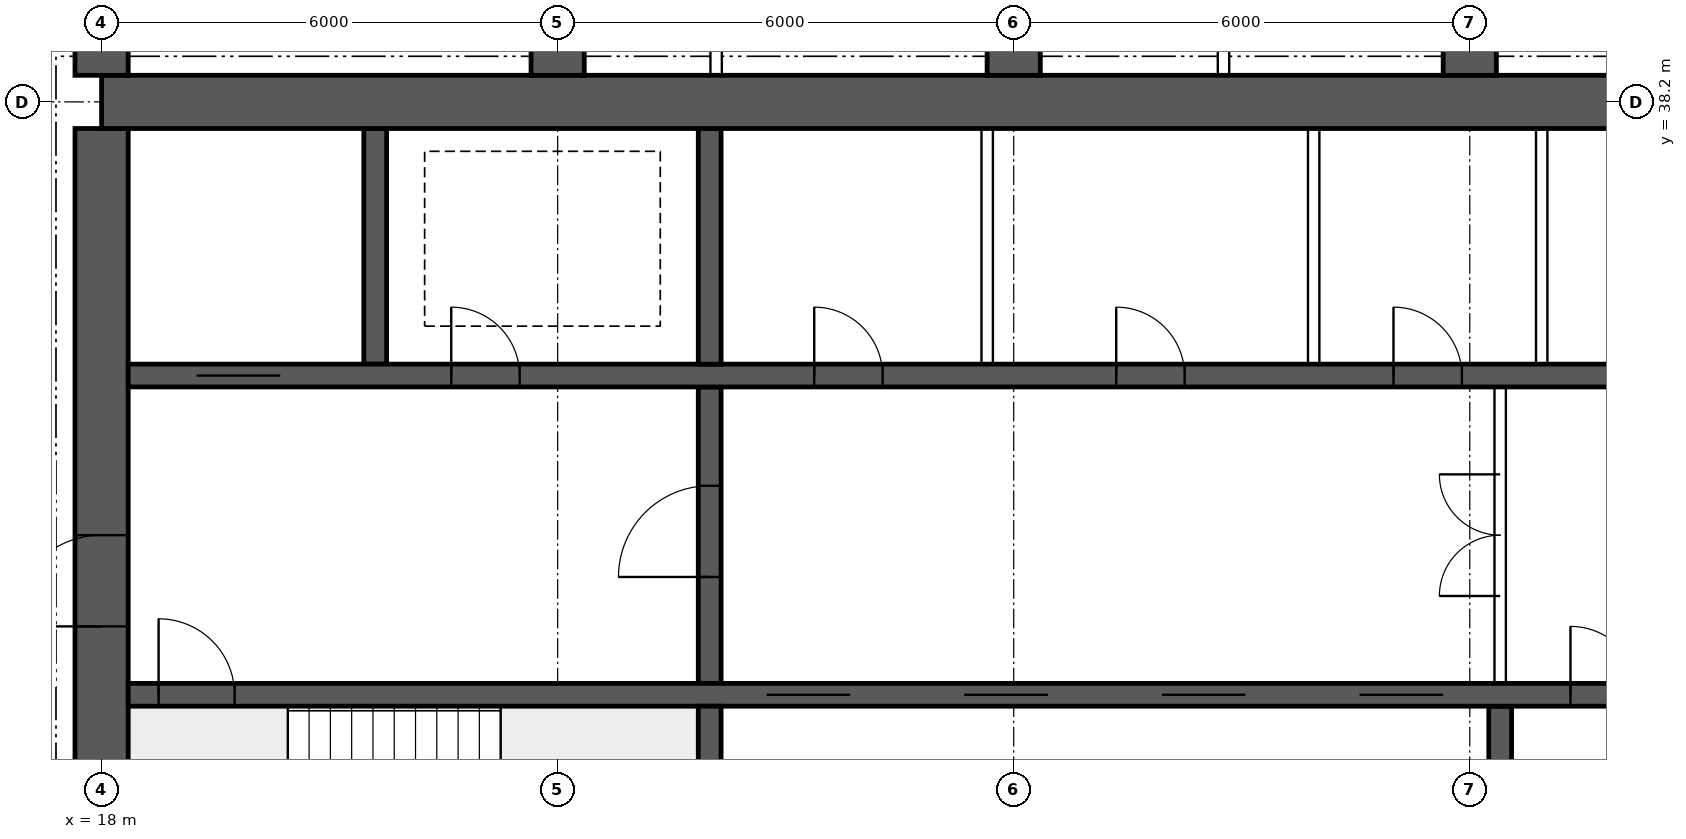
"""IFC4 building model, lengths in metres.
Left out: names, types, materials, properties, quantities, classifications, styles, units other than length and angle.
Written with IfcOpenShell. Run it as: python <this file> out.ifc"""

import sys

from ifc_helpers import new_model, si_unit, direction, frame, frame_2d, origin, place, context, subcontext, project, spatial, rectangle, extrude, element, fill, save


model = new_model("IFC4")
c1 = context("Model", 3, precision=1e-05, world=origin(), true_north=direction((0.0, 1.0)))
c2 = subcontext(c1, "Body", "Model", "MODEL_VIEW")
j1 = project(units=[si_unit("LENGTHUNIT", "METRE"), si_unit("PLANEANGLEUNIT", "RADIAN")], contexts=[c1])
p1 = place(None, origin())
s1 = spatial("IfcSite", under=j1, at=p1, CompositionType="ELEMENT")
p2 = place(p1, origin())
s2 = spatial("IfcBuilding", under=s1, at=p2, CompositionType="ELEMENT")
p3 = place(p2, frame((0.0, 0.0, 216.55)))
s3 = spatial("IfcBuildingStorey", under=s2, at=p3, CompositionType="ELEMENT", Elevation=216.55)
p4 = place(p3, frame((18.0, 38.2, 0.0), z_axis=(0.0, 0.0, 1.0), x_axis=(1.0, 0.0, 0.0)))
e1 = element("IfcWall", 1, at=p4, inside=s3, PredefinedType="SHEAR", context=c2, shape_type="SweptSolid", body=[
    extrude(rectangle(XDim=48.0, YDim=0.7, at=frame_2d((24.0, 0.0))), origin(), (0.0, 0.0, 1.0), 3.75),
])
p5 = place(p3, frame((18.0, 26.15, 0.0), z_axis=(0.0, 0.0, 1.0), x_axis=(0.0, 1.0, 0.0)))
e2 = element("IfcWall", 2, at=p5, inside=s3, PredefinedType="SHEAR", context=c2, shape_type="SweptSolid", body=[
    extrude(rectangle(XDim=11.7, YDim=0.7, at=frame_2d((5.85, 0.0))), origin(), (0.0, 0.0, 1.0), 3.75),
])
p6 = place(p5, frame((5.15, 0.0, 0.0)))
e3 = element("IfcOpeningElement", 3, at=p6, cuts=e2, PredefinedType="OPENING", context=c2, shape_type="SweptSolid", body=[
    extrude(rectangle(XDim=1.2, YDim=2.1, at=frame_2d((0.6, 1.05))), frame((0.0, 0.36, 0.0), z_axis=(0.0, -1.0, 0.0), x_axis=(1.0, 0.0, 0.0)), (0.0, 0.0, 1.0), 0.72),
])
p7 = place(p3, frame((18.35, 30.4, 0.0), z_axis=(0.0, 0.0, 1.0), x_axis=(1.0, 0.0, 0.0)))
e4 = element("IfcWall", 4, at=p7, inside=s3, PredefinedType="SHEAR", context=c2, shape_type="SweptSolid", body=[
    extrude(rectangle(XDim=47.3, YDim=0.3, at=frame_2d((23.65, 0.0))), origin(), (0.0, 0.0, 1.0), 3.75),
])
p8 = place(p7, frame((0.4, 0.0, 0.0)))
e5 = element("IfcOpeningElement", 5, at=p8, cuts=e4, PredefinedType="OPENING", context=c2, shape_type="SweptSolid", body=[
    extrude(rectangle(XDim=1.0, YDim=2.1, at=frame_2d((0.5, 1.05))), frame((0.0, 0.16, 0.0), z_axis=(0.0, -1.0, 0.0), x_axis=(1.0, 0.0, 0.0)), (0.0, 0.0, 1.0), 0.32),
])
p9 = place(p7, frame((45.9, 0.0, 0.0)))
e6 = element("IfcOpeningElement", 6, at=p9, cuts=e4, PredefinedType="OPENING", context=c2, shape_type="SweptSolid", body=[
    extrude(rectangle(XDim=1.0, YDim=2.1, at=frame_2d((0.5, 1.05))), frame((0.0, 0.16, 0.0), z_axis=(0.0, -1.0, 0.0), x_axis=(1.0, 0.0, 0.0)), (0.0, 0.0, 1.0), 0.32),
])
p10 = place(p7, frame((8.4, 0.0, 0.0)))
e7 = element("IfcOpeningElement", 7, at=p10, cuts=e4, PredefinedType="OPENING", context=c2, shape_type="SweptSolid", body=[
    extrude(rectangle(XDim=1.1, YDim=2.1, at=frame_2d((0.55, 1.05))), frame((0.0, 0.16, 0.0), z_axis=(0.0, -1.0, 0.0), x_axis=(1.0, 0.0, 0.0)), (0.0, 0.0, 1.0), 0.32),
])
p11 = place(p7, frame((11.0, 0.0, 0.0)))
e8 = element("IfcOpeningElement", 8, at=p11, cuts=e4, PredefinedType="OPENING", context=c2, shape_type="SweptSolid", body=[
    extrude(rectangle(XDim=1.1, YDim=2.1, at=frame_2d((0.55, 1.05))), frame((0.0, 0.16, 0.0), z_axis=(0.0, -1.0, 0.0), x_axis=(1.0, 0.0, 0.0)), (0.0, 0.0, 1.0), 0.32),
])
p12 = place(p7, frame((13.6, 0.0, 0.0)))
e9 = element("IfcOpeningElement", 9, at=p12, cuts=e4, PredefinedType="OPENING", context=c2, shape_type="SweptSolid", body=[
    extrude(rectangle(XDim=1.1, YDim=2.1, at=frame_2d((0.55, 1.05))), frame((0.0, 0.16, 0.0), z_axis=(0.0, -1.0, 0.0), x_axis=(1.0, 0.0, 0.0)), (0.0, 0.0, 1.0), 0.32),
])
p13 = place(p7, frame((16.2, 0.0, 0.0)))
e10 = element("IfcOpeningElement", 10, at=p13, cuts=e4, PredefinedType="OPENING", context=c2, shape_type="SweptSolid", body=[
    extrude(rectangle(XDim=1.1, YDim=2.1, at=frame_2d((0.55, 1.05))), frame((0.0, 0.16, 0.0), z_axis=(0.0, -1.0, 0.0), x_axis=(1.0, 0.0, 0.0)), (0.0, 0.0, 1.0), 0.32),
])
p14 = place(p7, frame((18.975, 0.0, 0.0)))
e11 = element("IfcOpeningElement", 11, at=p14, cuts=e4, PredefinedType="OPENING", context=c2, shape_type="SweptSolid", body=[
    extrude(rectangle(XDim=0.9, YDim=2.1, at=frame_2d((0.45, 1.05))), frame((0.0, 0.16, 0.0), z_axis=(0.0, -1.0, 0.0), x_axis=(1.0, 0.0, 0.0)), (0.0, 0.0, 1.0), 0.32),
])
p15 = place(p7, frame((24.475, 0.0, 0.0)))
e12 = element("IfcOpeningElement", 12, at=p15, cuts=e4, PredefinedType="OPENING", context=c2, shape_type="SweptSolid", body=[
    extrude(rectangle(XDim=0.9, YDim=2.1, at=frame_2d((0.45, 1.05))), frame((0.0, 0.16, 0.0), z_axis=(0.0, -1.0, 0.0), x_axis=(1.0, 0.0, 0.0)), (0.0, 0.0, 1.0), 0.32),
])
p16 = place(p7, frame((30.267, 0.0, 0.0)))
e13 = element("IfcOpeningElement", 13, at=p16, cuts=e4, PredefinedType="OPENING", context=c2, shape_type="SweptSolid", body=[
    extrude(rectangle(XDim=1.1, YDim=2.1, at=frame_2d((0.55, 1.05))), frame((0.0, 0.16, 0.0), z_axis=(0.0, -1.0, 0.0), x_axis=(1.0, 0.0, 0.0)), (0.0, 0.0, 1.0), 0.32),
])
p17 = place(p7, frame((33.8, 0.0, 0.0)))
e14 = element("IfcOpeningElement", 14, at=p17, cuts=e4, PredefinedType="OPENING", context=c2, shape_type="SweptSolid", body=[
    extrude(rectangle(XDim=1.1, YDim=2.1, at=frame_2d((0.55, 1.05))), frame((0.0, 0.16, 0.0), z_axis=(0.0, -1.0, 0.0), x_axis=(1.0, 0.0, 0.0)), (0.0, 0.0, 1.0), 0.32),
])
p18 = place(p7, frame((37.333, 0.0, 0.0)))
e15 = element("IfcOpeningElement", 15, at=p18, cuts=e4, PredefinedType="OPENING", context=c2, shape_type="SweptSolid", body=[
    extrude(rectangle(XDim=1.1, YDim=2.1, at=frame_2d((0.55, 1.05))), frame((0.0, 0.16, 0.0), z_axis=(0.0, -1.0, 0.0), x_axis=(1.0, 0.0, 0.0)), (0.0, 0.0, 1.0), 0.32),
])
p19 = place(p3, frame((18.35, 34.6, 0.0), z_axis=(0.0, 0.0, 1.0), x_axis=(1.0, 0.0, 0.0)))
e16 = element("IfcWall", 16, at=p19, inside=s3, PredefinedType="SHEAR", context=c2, shape_type="SweptSolid", body=[
    extrude(rectangle(XDim=47.3, YDim=0.3, at=frame_2d((23.65, 0.0))), origin(), (0.0, 0.0, 1.0), 3.75),
])
p20 = place(p19, frame((0.9, 0.0, 0.0)))
e17 = element("IfcOpeningElement", 17, at=p20, cuts=e16, PredefinedType="OPENING", context=c2, shape_type="SweptSolid", body=[
    extrude(rectangle(XDim=1.1, YDim=2.1, at=frame_2d((0.55, 1.05))), frame((0.0, 0.16, 0.0), z_axis=(0.0, -1.0, 0.0), x_axis=(1.0, 0.0, 0.0)), (0.0, 0.0, 1.0), 0.32),
])
p21 = place(p19, frame((45.3, 0.0, 0.0)))
e18 = element("IfcOpeningElement", 18, at=p21, cuts=e16, PredefinedType="OPENING", context=c2, shape_type="SweptSolid", body=[
    extrude(rectangle(XDim=1.1, YDim=2.1, at=frame_2d((0.55, 1.05))), frame((0.0, 0.16, 0.0), z_axis=(0.0, -1.0, 0.0), x_axis=(1.0, 0.0, 0.0)), (0.0, 0.0, 1.0), 0.32),
])
p22 = place(p19, frame((4.25, 0.0, 0.0)))
e19 = element("IfcOpeningElement", 19, at=p22, cuts=e16, PredefinedType="OPENING", context=c2, shape_type="SweptSolid", body=[
    extrude(rectangle(XDim=0.9, YDim=2.1, at=frame_2d((0.45, 1.05))), frame((0.0, 0.16, 0.0), z_axis=(0.0, -1.0, 0.0), x_axis=(1.0, 0.0, 0.0)), (0.0, 0.0, 1.0), 0.32),
])
p23 = place(p19, frame((42.15, 0.0, 0.0)))
e20 = element("IfcOpeningElement", 20, at=p23, cuts=e16, PredefinedType="OPENING", context=c2, shape_type="SweptSolid", body=[
    extrude(rectangle(XDim=0.9, YDim=2.1, at=frame_2d((0.45, 1.05))), frame((0.0, 0.16, 0.0), z_axis=(0.0, -1.0, 0.0), x_axis=(1.0, 0.0, 0.0)), (0.0, 0.0, 1.0), 0.32),
])
p24 = place(p19, frame((9.025, 0.0, 0.0)))
e21 = element("IfcOpeningElement", 21, at=p24, cuts=e16, PredefinedType="OPENING", context=c2, shape_type="SweptSolid", body=[
    extrude(rectangle(XDim=0.9, YDim=2.1, at=frame_2d((0.45, 1.05))), frame((0.0, 0.16, 0.0), z_axis=(0.0, -1.0, 0.0), x_axis=(1.0, 0.0, 0.0)), (0.0, 0.0, 1.0), 0.32),
])
p25 = place(p19, frame((12.999, 0.0, 0.0)))
e22 = element("IfcOpeningElement", 22, at=p25, cuts=e16, PredefinedType="OPENING", context=c2, shape_type="SweptSolid", body=[
    extrude(rectangle(XDim=0.9, YDim=2.1, at=frame_2d((0.45, 1.05))), frame((0.0, 0.16, 0.0), z_axis=(0.0, -1.0, 0.0), x_axis=(1.0, 0.0, 0.0)), (0.0, 0.0, 1.0), 0.32),
])
p26 = place(p19, frame((16.646, 0.0, 0.0)))
e23 = element("IfcOpeningElement", 23, at=p26, cuts=e16, PredefinedType="OPENING", context=c2, shape_type="SweptSolid", body=[
    extrude(rectangle(XDim=0.9, YDim=2.1, at=frame_2d((0.45, 1.05))), frame((0.0, 0.16, 0.0), z_axis=(0.0, -1.0, 0.0), x_axis=(1.0, 0.0, 0.0)), (0.0, 0.0, 1.0), 0.32),
])
p27 = place(p19, frame((20.405, 0.0, 0.0)))
e24 = element("IfcOpeningElement", 24, at=p27, cuts=e16, PredefinedType="OPENING", context=c2, shape_type="SweptSolid", body=[
    extrude(rectangle(XDim=0.9, YDim=2.1, at=frame_2d((0.45, 1.05))), frame((0.0, 0.16, 0.0), z_axis=(0.0, -1.0, 0.0), x_axis=(1.0, 0.0, 0.0)), (0.0, 0.0, 1.0), 0.32),
])
p28 = place(p19, frame((24.811, 0.0, 0.0)))
e25 = element("IfcOpeningElement", 25, at=p28, cuts=e16, PredefinedType="OPENING", context=c2, shape_type="SweptSolid", body=[
    extrude(rectangle(XDim=0.9, YDim=2.1, at=frame_2d((0.45, 1.05))), frame((0.0, 0.16, 0.0), z_axis=(0.0, -1.0, 0.0), x_axis=(1.0, 0.0, 0.0)), (0.0, 0.0, 1.0), 0.32),
])
p29 = place(p19, frame((27.608, 0.0, 0.0)))
e26 = element("IfcOpeningElement", 26, at=p29, cuts=e16, PredefinedType="OPENING", context=c2, shape_type="SweptSolid", body=[
    extrude(rectangle(XDim=0.9, YDim=2.1, at=frame_2d((0.45, 1.05))), frame((0.0, 0.16, 0.0), z_axis=(0.0, -1.0, 0.0), x_axis=(1.0, 0.0, 0.0)), (0.0, 0.0, 1.0), 0.32),
])
p30 = place(p19, frame((29.981, 0.0, 0.0)))
e27 = element("IfcOpeningElement", 27, at=p30, cuts=e16, PredefinedType="OPENING", context=c2, shape_type="SweptSolid", body=[
    extrude(rectangle(XDim=0.9, YDim=2.1, at=frame_2d((0.45, 1.05))), frame((0.0, 0.16, 0.0), z_axis=(0.0, -1.0, 0.0), x_axis=(1.0, 0.0, 0.0)), (0.0, 0.0, 1.0), 0.32),
])
p31 = place(p19, frame((33.831, 0.0, 0.0)))
e28 = element("IfcOpeningElement", 28, at=p31, cuts=e16, PredefinedType="OPENING", context=c2, shape_type="SweptSolid", body=[
    extrude(rectangle(XDim=0.9, YDim=2.1, at=frame_2d((0.45, 1.05))), frame((0.0, 0.16, 0.0), z_axis=(0.0, -1.0, 0.0), x_axis=(1.0, 0.0, 0.0)), (0.0, 0.0, 1.0), 0.32),
])
p32 = place(p19, frame((37.579, 0.0, 0.0)))
e29 = element("IfcOpeningElement", 29, at=p32, cuts=e16, PredefinedType="OPENING", context=c2, shape_type="SweptSolid", body=[
    extrude(rectangle(XDim=0.9, YDim=2.1, at=frame_2d((0.45, 1.05))), frame((0.0, 0.16, 0.0), z_axis=(0.0, -1.0, 0.0), x_axis=(1.0, 0.0, 0.0)), (0.0, 0.0, 1.0), 0.32),
])
p33 = place(p3, frame((26.0, 26.15, 0.0), z_axis=(0.0, 0.0, 1.0), x_axis=(0.0, 1.0, 0.0)))
e30 = element("IfcWall", 30, at=p33, inside=s3, PredefinedType="SHEAR", context=c2, shape_type="SweptSolid", body=[
    extrude(rectangle(XDim=4.1, YDim=0.3, at=frame_2d((2.05, 0.0))), origin(), (0.0, 0.0, 1.0), 3.75),
])
p34 = place(p3, frame((26.0, 30.55, 0.0), z_axis=(0.0, 0.0, 1.0), x_axis=(0.0, 1.0, 0.0)))
e31 = element("IfcWall", 31, at=p34, inside=s3, PredefinedType="SHEAR", context=c2, shape_type="SweptSolid", body=[
    extrude(rectangle(XDim=3.9, YDim=0.3, at=frame_2d((1.95, 0.0))), origin(), (0.0, 0.0, 1.0), 3.75),
])
p35 = place(p34, frame((1.4, 0.0, 0.0)))
e32 = element("IfcOpeningElement", 32, at=p35, cuts=e31, PredefinedType="OPENING", context=c2, shape_type="SweptSolid", body=[
    extrude(rectangle(XDim=1.2, YDim=2.1, at=frame_2d((0.6, 1.05))), frame((0.0, 0.16, 0.0), z_axis=(0.0, -1.0, 0.0), x_axis=(1.0, 0.0, 0.0)), (0.0, 0.0, 1.0), 0.32),
])
for number, where, z_axis, x_axis in (
    (33, (21.6, 34.75, 0.0), (0.0, 0.0, 1.0), (0.0, 1.0, 0.0)),
    (34, (26.0, 34.75, 0.0), (0.0, 0.0, 1.0), (0.0, 1.0, 0.0)),
):
    element("IfcWall", number, at=place(p3, frame(where, z_axis=z_axis, x_axis=x_axis)), inside=s3, PredefinedType="SHEAR", context=c2, shape_type="SweptSolid", body=[
        extrude(rectangle(XDim=3.1, YDim=0.3, at=frame_2d((1.55, 0.0))), origin(), (0.0, 0.0, 1.0), 3.75),
    ])
p36 = place(p3, frame((36.4, 26.15, 0.0), z_axis=(0.0, 0.0, 1.0), x_axis=(0.0, 1.0, 0.0)))
e35 = element("IfcWall", 35, at=p36, inside=s3, PredefinedType="SHEAR", context=c2, shape_type="SweptSolid", body=[
    extrude(rectangle(XDim=4.1, YDim=0.3, at=frame_2d((2.05, 0.0))), origin(), (0.0, 0.0, 1.0), 3.75),
])
for number, where, z_axis, x_axis in (
    (36, (18.0, 38.55, 0.0), (0.0, 0.0, 1.0), (0.0, 1.0, 0.0)),
    (37, (24.0, 38.55, 0.0), (0.0, 0.0, 1.0), (0.0, 1.0, 0.0)),
    (38, (30.0, 38.55, 0.0), (0.0, 0.0, 1.0), (0.0, 1.0, 0.0)),
    (39, (36.0, 38.55, 0.0), (0.0, 0.0, 1.0), (0.0, 1.0, 0.0)),
):
    element("IfcWall", number, at=place(p3, frame(where, z_axis=z_axis, x_axis=x_axis)), inside=s3, PredefinedType="SHEAR", context=c2, shape_type="SweptSolid", body=[
        extrude(rectangle(XDim=7.05, YDim=0.7, at=frame_2d((3.525, 0.0))), origin(), (0.0, 0.0, 1.0), 3.75),
    ])
p37 = place(p3, frame((36.4, 30.55, 0.0), z_axis=(0.0, 0.0, 1.0), x_axis=(0.0, 1.0, 0.0)))
e40 = element("IfcWall", 40, at=p37, inside=s3, PredefinedType="SOLIDWALL", context=c2, shape_type="SweptSolid", body=[
    extrude(rectangle(XDim=3.9, YDim=0.15, at=frame_2d((1.95, 0.0))), origin(), (0.0, 0.0, 1.0), 3.5),
])
p38 = place(p37, frame((1.15, 0.0, 0.0)))
e41 = element("IfcOpeningElement", 41, at=p38, cuts=e40, PredefinedType="OPENING", context=c2, shape_type="SweptSolid", body=[
    extrude(rectangle(XDim=1.6, YDim=2.1, at=frame_2d((0.8, 1.05))), frame((0.0, 0.085, 0.0), z_axis=(0.0, -1.0, 0.0), x_axis=(1.0, 0.0, 0.0)), (0.0, 0.0, 1.0), 0.17),
])
for number, where, z_axis, x_axis in (
    (42, (29.651, 34.75, 0.0), (0.0, 0.0, 1.0), (0.0, 1.0, 0.0)),
    (43, (33.946, 34.75, 0.0), (0.0, 0.0, 1.0), (0.0, 1.0, 0.0)),
    (44, (36.946, 34.75, 0.0), (0.0, 0.0, 1.0), (0.0, 1.0, 0.0)),
):
    element("IfcWall", number, at=place(p3, frame(where, z_axis=z_axis, x_axis=x_axis)), inside=s3, PredefinedType="SOLIDWALL", context=c2, shape_type="SweptSolid", body=[
        extrude(rectangle(XDim=3.1, YDim=0.15, at=frame_2d((1.55, 0.0))), origin(), (0.0, 0.0, 1.0), 3.5),
    ])
for number, where, z_axis, x_axis in (
    (45, (26.085, 38.55, 0.0), (0.0, 0.0, 1.0), (0.0, 1.0, 0.0)),
    (46, (32.76, 38.55, 0.0), (0.0, 0.0, 1.0), (0.0, 1.0, 0.0)),
):
    element("IfcWall", number, at=place(p3, frame(where, z_axis=z_axis, x_axis=x_axis)), inside=s3, PredefinedType="PARTITIONING", context=c2, shape_type="SweptSolid", body=[
        extrude(rectangle(XDim=6.95, YDim=0.15, at=frame_2d((3.475, 0.0))), origin(), (0.0, 0.0, 1.0), 3.5),
    ])
p39 = place(p38, origin())
e47 = element("IfcDoor", 47, at=p39, inside=s3, OperationType="DOUBLE_DOOR_SINGLE_SWING", PredefinedType="DOOR", context=c2, shape_type="SweptSolid", body=[
    extrude(rectangle(XDim=1.6, YDim=2.1, at=frame_2d((0.8, 1.05))), frame((0.0, 0.025, 0.0), z_axis=(0.0, -1.0, 0.0), x_axis=(1.0, 0.0, 0.0)), (0.0, 0.0, 1.0), 0.05),
])
fill(e41, e47)
p40 = place(p6, origin())
e48 = element("IfcDoor", 48, at=p40, inside=s3, OperationType="SINGLE_SWING_LEFT", PredefinedType="DOOR", context=c2, shape_type="SweptSolid", body=[
    extrude(rectangle(XDim=1.2, YDim=2.1, at=frame_2d((0.6, 1.05))), frame((0.0, 0.025, 0.0), z_axis=(0.0, -1.0, 0.0), x_axis=(1.0, 0.0, 0.0)), (0.0, 0.0, 1.0), 0.05),
])
fill(e3, e48)
p41 = place(p8, origin())
e49 = element("IfcDoor", 49, at=p41, inside=s3, OperationType="SINGLE_SWING_LEFT", PredefinedType="DOOR", context=c2, shape_type="SweptSolid", body=[
    extrude(rectangle(XDim=1.0, YDim=2.1, at=frame_2d((0.5, 1.05))), frame((0.0, 0.025, 0.0), z_axis=(0.0, -1.0, 0.0), x_axis=(1.0, 0.0, 0.0)), (0.0, 0.0, 1.0), 0.05),
])
fill(e5, e49)
p42 = place(p20, origin())
e50 = element("IfcDoor", 50, at=p42, inside=s3, OperationType="DOUBLE_DOOR_SLIDING", PredefinedType="DOOR", context=c2, shape_type="SweptSolid", body=[
    extrude(rectangle(XDim=1.1, YDim=2.1, at=frame_2d((0.55, 1.05))), frame((0.0, 0.025, 0.0), z_axis=(0.0, -1.0, 0.0), x_axis=(1.0, 0.0, 0.0)), (0.0, 0.0, 1.0), 0.05),
])
fill(e17, e50)
p43 = place(p22, origin())
e51 = element("IfcDoor", 51, at=p43, inside=s3, OperationType="SINGLE_SWING_LEFT", PredefinedType="DOOR", context=c2, shape_type="SweptSolid", body=[
    extrude(rectangle(XDim=0.9, YDim=2.1, at=frame_2d((0.45, 1.05))), frame((0.0, 0.025, 0.0), z_axis=(0.0, -1.0, 0.0), x_axis=(1.0, 0.0, 0.0)), (0.0, 0.0, 1.0), 0.05),
])
fill(e19, e51)
p44 = place(p35, origin())
e52 = element("IfcDoor", 52, at=p44, inside=s3, OperationType="SINGLE_SWING_LEFT", PredefinedType="DOOR", context=c2, shape_type="SweptSolid", body=[
    extrude(rectangle(XDim=1.2, YDim=2.1, at=frame_2d((0.6, 1.05))), frame((0.0, 0.025, 0.0), z_axis=(0.0, -1.0, 0.0), x_axis=(1.0, 0.0, 0.0)), (0.0, 0.0, 1.0), 0.05),
])
fill(e32, e52)
p45 = place(p24, origin())
e53 = element("IfcDoor", 53, at=p45, inside=s3, OperationType="SINGLE_SWING_LEFT", PredefinedType="DOOR", context=c2, shape_type="SweptSolid", body=[
    extrude(rectangle(XDim=0.9, YDim=2.1, at=frame_2d((0.45, 1.05))), frame((0.0, 0.025, 0.0), z_axis=(0.0, -1.0, 0.0), x_axis=(1.0, 0.0, 0.0)), (0.0, 0.0, 1.0), 0.05),
])
fill(e21, e53)
p46 = place(p25, origin())
e54 = element("IfcDoor", 54, at=p46, inside=s3, OperationType="SINGLE_SWING_LEFT", PredefinedType="DOOR", context=c2, shape_type="SweptSolid", body=[
    extrude(rectangle(XDim=0.9, YDim=2.1, at=frame_2d((0.45, 1.05))), frame((0.0, 0.025, 0.0), z_axis=(0.0, -1.0, 0.0), x_axis=(1.0, 0.0, 0.0)), (0.0, 0.0, 1.0), 0.05),
])
fill(e22, e54)
p47 = place(p26, origin())
e55 = element("IfcDoor", 55, at=p47, inside=s3, OperationType="SINGLE_SWING_LEFT", PredefinedType="DOOR", context=c2, shape_type="SweptSolid", body=[
    extrude(rectangle(XDim=0.9, YDim=2.1, at=frame_2d((0.45, 1.05))), frame((0.0, 0.025, 0.0), z_axis=(0.0, -1.0, 0.0), x_axis=(1.0, 0.0, 0.0)), (0.0, 0.0, 1.0), 0.05),
])
fill(e23, e55)
p48 = place(p10, origin())
e56 = element("IfcDoor", 56, at=p48, inside=s3, OperationType="DOUBLE_DOOR_SLIDING", PredefinedType="DOOR", context=c2, shape_type="SweptSolid", body=[
    extrude(rectangle(XDim=1.1, YDim=2.1, at=frame_2d((0.55, 1.05))), frame((0.0, 0.025, 0.0), z_axis=(0.0, -1.0, 0.0), x_axis=(1.0, 0.0, 0.0)), (0.0, 0.0, 1.0), 0.05),
])
fill(e7, e56)
p49 = place(p11, origin())
e57 = element("IfcDoor", 57, at=p49, inside=s3, OperationType="DOUBLE_DOOR_SLIDING", PredefinedType="DOOR", context=c2, shape_type="SweptSolid", body=[
    extrude(rectangle(XDim=1.1, YDim=2.1, at=frame_2d((0.55, 1.05))), frame((0.0, 0.025, 0.0), z_axis=(0.0, -1.0, 0.0), x_axis=(1.0, 0.0, 0.0)), (0.0, 0.0, 1.0), 0.05),
])
fill(e8, e57)
p50 = place(p12, origin())
e58 = element("IfcDoor", 58, at=p50, inside=s3, OperationType="DOUBLE_DOOR_SLIDING", PredefinedType="DOOR", context=c2, shape_type="SweptSolid", body=[
    extrude(rectangle(XDim=1.1, YDim=2.1, at=frame_2d((0.55, 1.05))), frame((0.0, 0.025, 0.0), z_axis=(0.0, -1.0, 0.0), x_axis=(1.0, 0.0, 0.0)), (0.0, 0.0, 1.0), 0.05),
])
fill(e9, e58)
p51 = place(p13, origin())
e59 = element("IfcDoor", 59, at=p51, inside=s3, OperationType="DOUBLE_DOOR_SLIDING", PredefinedType="DOOR", context=c2, shape_type="SweptSolid", body=[
    extrude(rectangle(XDim=1.1, YDim=2.1, at=frame_2d((0.55, 1.05))), frame((0.0, 0.025, 0.0), z_axis=(0.0, -1.0, 0.0), x_axis=(1.0, 0.0, 0.0)), (0.0, 0.0, 1.0), 0.05),
])
fill(e10, e59)
p52 = place(p14, origin())
e60 = element("IfcDoor", 60, at=p52, inside=s3, OperationType="SINGLE_SWING_LEFT", PredefinedType="DOOR", context=c2, shape_type="SweptSolid", body=[
    extrude(rectangle(XDim=0.9, YDim=2.1, at=frame_2d((0.45, 1.05))), frame((0.0, 0.025, 0.0), z_axis=(0.0, -1.0, 0.0), x_axis=(1.0, 0.0, 0.0)), (0.0, 0.0, 1.0), 0.05),
])
fill(e11, e60)
save(model, sys.argv[1])
